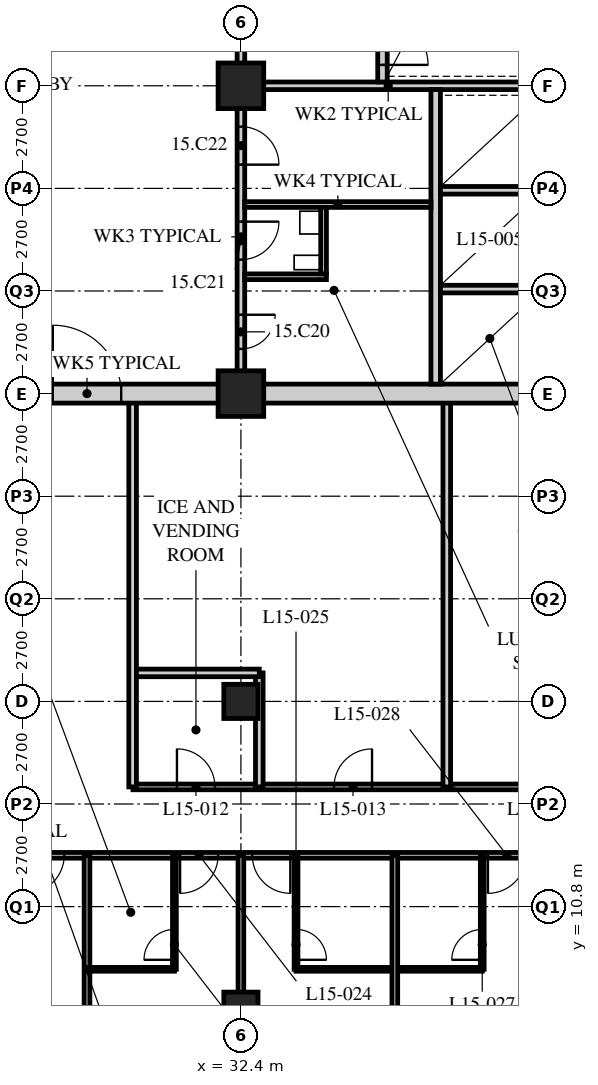
"""IFC4 building model, lengths in metres.
Left out: names, types, materials, properties, quantities, classifications, styles, units other than length and angle.
Written with IfcOpenShell. Run it as: python <this file> out.ifc"""

import sys

from ifc_helpers import new_model, si_unit, direction, frame, frame_2d, origin, origin_2d, place, context, subcontext, project, spatial, rectangle, hollow_rectangle, extrude, element, fill, save


model = new_model("IFC4")
c1 = context("Model", 3, precision=1e-05, world=origin(), true_north=direction((0.0, 1.0)))
c2 = subcontext(c1, "Body", "Model", "MODEL_VIEW")
j1 = project(units=[si_unit("LENGTHUNIT", "METRE"), si_unit("PLANEANGLEUNIT", "RADIAN")], contexts=[c1])
p1 = place(None, origin())
s1 = spatial("IfcSite", under=j1, at=p1, CompositionType="ELEMENT")
p2 = place(p1, origin())
s2 = spatial("IfcBuilding", under=s1, at=p2, CompositionType="ELEMENT")
p3 = place(p2, frame((0.0, 0.0, 63.6)))
s3 = spatial("IfcBuildingStorey", under=s2, at=p3, CompositionType="ELEMENT", Elevation=63.6)
for number, where, z_axis, x_axis in (
    (1, (32.4, 8.1, 0.0), (0.0, 0.0, 1.0), (1.0, 0.0, 0.0)),
    (2, (32.4, 16.2, 0.0), (0.0, 0.0, 1.0), (1.0, 0.0, 0.0)),
):
    element("IfcColumn", number, at=place(p3, frame(where, z_axis=z_axis, x_axis=x_axis)), inside=s3, PredefinedType="COLUMN", context=c2, shape_type="SweptSolid", body=[
        extrude(hollow_rectangle(XDim=0.9, YDim=0.9, WallThickness=0.09, at=origin_2d()), origin(), (0.0, 0.0, 1.0), 3.4),
    ])
for number, where, z_axis, x_axis in (
    (3, (32.4, 24.3, 0.0), (0.0, 0.0, 1.0), (1.0, 0.0, 0.0)),
    (4, (32.4, 32.4, 0.0), (0.0, 0.0, 1.0), (1.0, 0.0, 0.0)),
):
    element("IfcColumn", number, at=place(p3, frame(where, z_axis=z_axis, x_axis=x_axis)), inside=s3, PredefinedType="COLUMN", context=c2, shape_type="SweptSolid", body=[
        extrude(hollow_rectangle(XDim=1.2, YDim=1.2, WallThickness=0.12, at=origin_2d()), origin(), (0.0, 0.0, 1.0), 3.4),
    ])
p4 = place(p3, frame((8.1, 12.15, 0.0), z_axis=(0.0, 0.0, 1.0), x_axis=(1.0, 0.0, 0.0)))
e5 = element("IfcWall", 5, at=p4, inside=s3, PredefinedType="PARTITIONING", context=c2, shape_type="SweptSolid", body=[
    extrude(rectangle(XDim=36.45, YDim=0.15, at=frame_2d((18.225, 0.0))), origin(), (0.0, 0.0, 1.0), 3.19),
])
p5 = place(p4, frame((4.35, 0.0, 0.0)))
e6 = element("IfcOpeningElement", 6, at=p5, cuts=e5, PredefinedType="OPENING", context=c2, shape_type="SweptSolid", body=[
    extrude(rectangle(XDim=1.0, YDim=2.1, at=frame_2d((0.5, 1.05))), frame((0.0, 0.085, 0.0), z_axis=(0.0, -1.0, 0.0), x_axis=(1.0, 0.0, 0.0)), (0.0, 0.0, 1.0), 0.17),
])
p6 = place(p4, frame((10.55, 0.0, 0.0)))
e7 = element("IfcOpeningElement", 7, at=p6, cuts=e5, PredefinedType="OPENING", context=c2, shape_type="SweptSolid", body=[
    extrude(rectangle(XDim=1.0, YDim=2.1, at=frame_2d((0.5, 1.05))), frame((0.0, 0.085, 0.0), z_axis=(0.0, -1.0, 0.0), x_axis=(1.0, 0.0, 0.0)), (0.0, 0.0, 1.0), 0.17),
])
p7 = place(p4, frame((14.6, 0.0, 0.0)))
e8 = element("IfcOpeningElement", 8, at=p7, cuts=e5, PredefinedType="OPENING", context=c2, shape_type="SweptSolid", body=[
    extrude(rectangle(XDim=1.0, YDim=2.1, at=frame_2d((0.5, 1.05))), frame((0.0, 0.085, 0.0), z_axis=(0.0, -1.0, 0.0), x_axis=(1.0, 0.0, 0.0)), (0.0, 0.0, 1.0), 0.17),
])
p8 = place(p4, frame((18.65, 0.0, 0.0)))
e9 = element("IfcOpeningElement", 9, at=p8, cuts=e5, PredefinedType="OPENING", context=c2, shape_type="SweptSolid", body=[
    extrude(rectangle(XDim=1.0, YDim=2.1, at=frame_2d((0.5, 1.05))), frame((0.0, 0.085, 0.0), z_axis=(0.0, -1.0, 0.0), x_axis=(1.0, 0.0, 0.0)), (0.0, 0.0, 1.0), 0.17),
])
p9 = place(p4, frame((22.7, 0.0, 0.0)))
e10 = element("IfcOpeningElement", 10, at=p9, cuts=e5, PredefinedType="OPENING", context=c2, shape_type="SweptSolid", body=[
    extrude(rectangle(XDim=1.0, YDim=2.1, at=frame_2d((0.5, 1.05))), frame((0.0, 0.085, 0.0), z_axis=(0.0, -1.0, 0.0), x_axis=(1.0, 0.0, 0.0)), (0.0, 0.0, 1.0), 0.17),
])
p10 = place(p4, frame((24.6, 0.0, 0.0)))
e11 = element("IfcOpeningElement", 11, at=p10, cuts=e5, PredefinedType="OPENING", context=c2, shape_type="SweptSolid", body=[
    extrude(rectangle(XDim=1.0, YDim=2.1, at=frame_2d((0.5, 1.05))), frame((0.0, 0.085, 0.0), z_axis=(0.0, -1.0, 0.0), x_axis=(1.0, 0.0, 0.0)), (0.0, 0.0, 1.0), 0.17),
])
p11 = place(p4, frame((30.8, 0.0, 0.0)))
e12 = element("IfcOpeningElement", 12, at=p11, cuts=e5, PredefinedType="OPENING", context=c2, shape_type="SweptSolid", body=[
    extrude(rectangle(XDim=1.0, YDim=2.1, at=frame_2d((0.5, 1.05))), frame((0.0, 0.085, 0.0), z_axis=(0.0, -1.0, 0.0), x_axis=(1.0, 0.0, 0.0)), (0.0, 0.0, 1.0), 0.17),
])
p12 = place(p4, frame((1.525, 0.0, 0.0)))
e13 = element("IfcOpeningElement", 13, at=p12, cuts=e5, PredefinedType="OPENING", context=c2, shape_type="SweptSolid", body=[
    extrude(rectangle(XDim=1.0, YDim=2.1, at=frame_2d((0.5, 1.05))), frame((0.0, 0.085, 0.0), z_axis=(0.0, -1.0, 0.0), x_axis=(1.0, 0.0, 0.0)), (0.0, 0.0, 1.0), 0.17),
])
p13 = place(p4, frame((33.925, 0.0, 0.0)))
e14 = element("IfcOpeningElement", 14, at=p13, cuts=e5, PredefinedType="OPENING", context=c2, shape_type="SweptSolid", body=[
    extrude(rectangle(XDim=1.0, YDim=2.1, at=frame_2d((0.5, 1.05))), frame((0.0, 0.085, 0.0), z_axis=(0.0, -1.0, 0.0), x_axis=(1.0, 0.0, 0.0)), (0.0, 0.0, 1.0), 0.17),
])
p14 = place(p3, frame((29.56, 13.95, 0.0), z_axis=(0.0, 0.0, 1.0), x_axis=(1.0, 0.0, 0.0)))
e15 = element("IfcWall", 15, at=p14, inside=s3, PredefinedType="PARTITIONING", context=c2, shape_type="SweptSolid", body=[
    extrude(rectangle(XDim=13.19, YDim=0.15, at=frame_2d((6.595, 0.0))), origin(), (0.0, 0.0, 1.0), 3.19),
])
p15 = place(p14, frame((1.157, 0.0, 0.0)))
e16 = element("IfcOpeningElement", 16, at=p15, cuts=e15, PredefinedType="OPENING", context=c2, shape_type="SweptSolid", body=[
    extrude(rectangle(XDim=1.0, YDim=2.1, at=frame_2d((0.5, 1.05))), frame((0.0, 0.085, 0.0), z_axis=(0.0, -1.0, 0.0), x_axis=(1.0, 0.0, 0.0)), (0.0, 0.0, 1.0), 0.17),
])
p16 = place(p14, frame((5.29, 0.0, 0.0)))
e17 = element("IfcOpeningElement", 17, at=p16, cuts=e15, PredefinedType="OPENING", context=c2, shape_type="SweptSolid", body=[
    extrude(rectangle(XDim=1.0, YDim=2.1, at=frame_2d((0.5, 1.05))), frame((0.0, 0.085, 0.0), z_axis=(0.0, -1.0, 0.0), x_axis=(1.0, 0.0, 0.0)), (0.0, 0.0, 1.0), 0.17),
])
p17 = place(p14, frame((10.223, 0.0, 0.0)))
e18 = element("IfcOpeningElement", 18, at=p17, cuts=e15, PredefinedType="OPENING", context=c2, shape_type="SweptSolid", body=[
    extrude(rectangle(XDim=1.0, YDim=2.1, at=frame_2d((0.5, 1.05))), frame((0.0, 0.085, 0.0), z_axis=(0.0, -1.0, 0.0), x_axis=(1.0, 0.0, 0.0)), (0.0, 0.0, 1.0), 0.17),
])
p18 = place(p3, frame((32.883, 13.95, 0.0), z_axis=(0.0, 0.0, 1.0), x_axis=(0.0, 1.0, 0.0)))
e19 = element("IfcWall", 19, at=p18, inside=s3, PredefinedType="SOLIDWALL", context=c2, shape_type="SweptSolid", body=[
    extrude(rectangle(XDim=3.0, YDim=0.2, at=frame_2d((1.5, 0.0))), origin(), (0.0, 0.0, 1.0), 3.19),
])
p19 = place(p3, frame((29.55, 16.95, 0.0), z_axis=(0.0, 0.0, 1.0), x_axis=(1.0, 0.0, 0.0)))
e20 = element("IfcWall", 20, at=p19, inside=s3, PredefinedType="SOLIDWALL", context=c2, shape_type="SweptSolid", body=[
    extrude(rectangle(XDim=3.333, YDim=0.2, at=frame_2d((1.667, 0.0))), origin(), (0.0, 0.0, 1.0), 3.19),
])
for number, where, z_axis, x_axis in (
    (21, (37.817, 13.95, 0.0), (0.0, 0.0, 1.0), (0.0, 1.0, 0.0)),
    (22, (29.55, 13.95, 0.0), (0.0, 0.0, 1.0), (0.0, 1.0, 0.0)),
):
    element("IfcWall", number, at=place(p3, frame(where, z_axis=z_axis, x_axis=x_axis)), inside=s3, PredefinedType="SOLIDWALL", context=c2, shape_type="SweptSolid", body=[
        extrude(rectangle(XDim=10.35, YDim=0.2, at=frame_2d((5.175, 0.0))), origin(), (0.0, 0.0, 1.0), 3.19),
    ])
p20 = place(p3, frame((28.35, 12.15, 0.0), z_axis=(0.0, 0.0, 1.0), x_axis=(0.0, -1.0, 0.0)))
e23 = element("IfcWall", 23, at=p20, inside=s3, PredefinedType="PARTITIONING", context=c2, shape_type="SweptSolid", body=[
    extrude(rectangle(XDim=11.85, YDim=0.15, at=frame_2d((5.925, 0.0))), origin(), (0.0, 0.0, 1.0), 3.19),
])
p21 = place(p3, frame((28.35, 9.15, 0.0), z_axis=(0.0, 0.0, 1.0), x_axis=(1.0, 0.0, 0.0)))
e24 = element("IfcWall", 24, at=p21, inside=s3, PredefinedType="PARTITIONING", context=c2, shape_type="SweptSolid", body=[
    extrude(rectangle(XDim=2.3, YDim=0.1, at=frame_2d((1.15, 0.0))), origin(), (0.0, 0.0, 1.0), 3.19),
])
p22 = place(p3, frame((30.65, 12.15, 0.0), z_axis=(0.0, 0.0, 1.0), x_axis=(0.0, -1.0, 0.0)))
e25 = element("IfcWall", 25, at=p22, inside=s3, PredefinedType="PARTITIONING", context=c2, shape_type="SweptSolid", body=[
    extrude(rectangle(XDim=3.0, YDim=0.1, at=frame_2d((1.5, 0.0))), origin(), (0.0, 0.0, 1.0), 3.19),
])
p23 = place(p22, frame((1.95, 0.0, 0.0)))
e26 = element("IfcOpeningElement", 26, at=p23, cuts=e25, PredefinedType="OPENING", context=c2, shape_type="SweptSolid", body=[
    extrude(rectangle(XDim=0.8, YDim=2.1, at=frame_2d((0.4, 1.05))), frame((0.0, 0.06, 0.0), z_axis=(0.0, -1.0, 0.0), x_axis=(1.0, 0.0, 0.0)), (0.0, 0.0, 1.0), 0.12),
])
p24 = place(p3, frame((32.4, 12.15, 0.0), z_axis=(0.0, 0.0, 1.0), x_axis=(0.0, -1.0, 0.0)))
e27 = element("IfcWall", 27, at=p24, inside=s3, PredefinedType="PARTITIONING", context=c2, shape_type="SweptSolid", body=[
    extrude(rectangle(XDim=11.85, YDim=0.15, at=frame_2d((5.925, 0.0))), origin(), (0.0, 0.0, 1.0), 2.578),
])
p25 = place(p3, frame((33.85, 9.15, 0.0), z_axis=(0.0, 0.0, 1.0), x_axis=(1.0, 0.0, 0.0)))
e28 = element("IfcWall", 28, at=p25, inside=s3, PredefinedType="PARTITIONING", context=c2, shape_type="SweptSolid", body=[
    extrude(rectangle(XDim=4.9, YDim=0.1, at=frame_2d((2.45, 0.0))), origin(), (0.0, 0.0, 1.0), 3.19),
])
p26 = place(p3, frame((33.85, 12.15, 0.0), z_axis=(0.0, 0.0, 1.0), x_axis=(0.0, -1.0, 0.0)))
e29 = element("IfcWall", 29, at=p26, inside=s3, PredefinedType="PARTITIONING", context=c2, shape_type="SweptSolid", body=[
    extrude(rectangle(XDim=3.0, YDim=0.1, at=frame_2d((1.5, 0.0))), origin(), (0.0, 0.0, 1.0), 3.19),
])
p27 = place(p26, frame((1.95, 0.0, 0.0)))
e30 = element("IfcOpeningElement", 30, at=p27, cuts=e29, PredefinedType="OPENING", context=c2, shape_type="SweptSolid", body=[
    extrude(rectangle(XDim=0.8, YDim=2.1, at=frame_2d((0.4, 1.05))), frame((0.0, 0.06, 0.0), z_axis=(0.0, -1.0, 0.0), x_axis=(1.0, 0.0, 0.0)), (0.0, 0.0, 1.0), 0.12),
])
p28 = place(p3, frame((36.45, 12.15, 0.0), z_axis=(0.0, 0.0, 1.0), x_axis=(0.0, -1.0, 0.0)))
e31 = element("IfcWall", 31, at=p28, inside=s3, PredefinedType="PARTITIONING", context=c2, shape_type="SweptSolid", body=[
    extrude(rectangle(XDim=11.85, YDim=0.15, at=frame_2d((5.925, 0.0))), origin(), (0.0, 0.0, 1.0), 3.19),
])
p29 = place(p3, frame((38.75, 12.15, 0.0), z_axis=(0.0, 0.0, 1.0), x_axis=(0.0, -1.0, 0.0)))
e32 = element("IfcWall", 32, at=p29, inside=s3, PredefinedType="PARTITIONING", context=c2, shape_type="SweptSolid", body=[
    extrude(rectangle(XDim=3.0, YDim=0.1, at=frame_2d((1.5, 0.0))), origin(), (0.0, 0.0, 1.0), 3.19),
])
p30 = place(p29, frame((1.95, 0.0, 0.0)))
e33 = element("IfcOpeningElement", 33, at=p30, cuts=e32, PredefinedType="OPENING", context=c2, shape_type="SweptSolid", body=[
    extrude(rectangle(XDim=0.8, YDim=2.1, at=frame_2d((0.4, 1.05))), frame((0.0, 0.06, 0.0), z_axis=(0.0, -1.0, 0.0), x_axis=(1.0, 0.0, 0.0)), (0.0, 0.0, 1.0), 0.12),
])
p31 = place(p3, frame((15.95, 24.3, 0.0), z_axis=(0.0, 0.0, 1.0), x_axis=(1.0, 0.0, 0.0)))
e34 = element("IfcWall", 34, at=p31, inside=s3, PredefinedType="SOLIDWALL", context=c2, shape_type="SweptSolid", body=[
    extrude(rectangle(XDim=24.8, YDim=0.5, at=frame_2d((12.4, 0.0))), origin(), (0.0, 0.0, 1.0), 2.54),
])
p32 = place(p31, frame((11.5, 0.0, 0.0)))
e35 = element("IfcOpeningElement", 35, at=p32, cuts=e34, PredefinedType="OPENING", context=c2, shape_type="SweptSolid", body=[
    extrude(rectangle(XDim=1.8, YDim=2.4, at=frame_2d((0.9, 1.2))), frame((0.0, 0.26, 0.0), z_axis=(0.0, -1.0, 0.0), x_axis=(1.0, 0.0, 0.0)), (0.0, 0.0, 1.0), 0.52),
])
p33 = place(p3, frame((32.3, 32.4, 0.0), z_axis=(0.0, 0.0, 1.0), x_axis=(1.0, 0.0, 0.0)))
e36 = element("IfcWall", 36, at=p33, inside=s3, PredefinedType="SOLIDWALL", context=c2, shape_type="SweptSolid", body=[
    extrude(rectangle(XDim=7.95, YDim=0.2, at=frame_2d((3.975, 0.0))), origin(), (0.0, 0.0, 1.0), 2.578),
])
p34 = place(p3, frame((32.4, 32.5, 0.0), z_axis=(0.0, 0.0, 1.0), x_axis=(0.0, 1.0, 0.0)))
e37 = element("IfcWall", 37, at=p34, inside=s3, PredefinedType="SOLIDWALL", context=c2, shape_type="SweptSolid", body=[
    extrude(rectangle(XDim=7.75, YDim=0.2, at=frame_2d((3.875, 0.0))), origin(), (0.0, 0.0, 1.0), 2.578),
])
p35 = place(p34, frame((1.9, 0.0, 0.0)))
e38 = element("IfcOpeningElement", 38, at=p35, cuts=e37, PredefinedType="OPENING", context=c2, shape_type="SweptSolid", body=[
    extrude(rectangle(XDim=1.2, YDim=2.1, at=frame_2d((0.6, 1.05))), frame((0.0, 0.11, 0.0), z_axis=(0.0, -1.0, 0.0), x_axis=(1.0, 0.0, 0.0)), (0.0, 0.0, 1.0), 0.22),
])
p36 = place(p3, frame((37.525, 24.55, 0.0), z_axis=(0.0, 0.0, 1.0), x_axis=(0.0, 1.0, 0.0)))
e39 = element("IfcWall", 39, at=p36, inside=s3, PredefinedType="SOLIDWALL", context=c2, shape_type="SweptSolid", body=[
    extrude(rectangle(XDim=7.75, YDim=0.25, at=frame_2d((3.875, 0.0))), origin(), (0.0, 0.0, 1.0), 3.19),
])
for number, where, z_axis, x_axis in (
    (40, (37.65, 27.05, 0.0), (0.0, 0.0, 1.0), (1.0, 0.0, 0.0)),
    (41, (37.65, 29.65, 0.0), (0.0, 0.0, 1.0), (1.0, 0.0, 0.0)),
):
    element("IfcWall", number, at=place(p3, frame(where, z_axis=z_axis, x_axis=x_axis)), inside=s3, PredefinedType="SOLIDWALL", context=c2, shape_type="SweptSolid", body=[
        extrude(rectangle(XDim=2.6, YDim=0.2, at=frame_2d((1.3, 0.0))), origin(), (0.0, 0.0, 1.0), 3.19),
    ])
p37 = place(p3, frame((36.125, 32.5, 0.0), z_axis=(0.0, 0.0, 1.0), x_axis=(0.0, 1.0, 0.0)))
e42 = element("IfcWall", 42, at=p37, inside=s3, PredefinedType="SOLIDWALL", context=c2, shape_type="SweptSolid", body=[
    extrude(rectangle(XDim=7.75, YDim=0.25, at=frame_2d((3.875, 0.0))), origin(), (0.0, 0.0, 1.0), 3.19),
])
p38 = place(p37, frame((0.45, 0.0, 0.0)))
e43 = element("IfcOpeningElement", 43, at=p38, cuts=e42, PredefinedType="OPENING", context=c2, shape_type="SweptSolid", body=[
    extrude(rectangle(XDim=1.2, YDim=2.1, at=frame_2d((0.6, 1.05))), frame((0.0, 0.135, 0.0), z_axis=(0.0, -1.0, 0.0), x_axis=(1.0, 0.0, 0.0)), (0.0, 0.0, 1.0), 0.27),
])
p39 = place(p3, frame((32.4, 24.55, 0.0), z_axis=(0.0, 0.0, 1.0), x_axis=(0.0, 1.0, 0.0)))
e44 = element("IfcWall", 44, at=p39, inside=s3, PredefinedType="PARTITIONING", context=c2, shape_type="SweptSolid", body=[
    extrude(rectangle(XDim=7.75, YDim=0.2, at=frame_2d((3.875, 0.0))), origin(), (0.0, 0.0, 1.0), 2.578),
])
p40 = place(p39, frame((0.925, 0.0, 0.0)))
e45 = element("IfcOpeningElement", 45, at=p40, cuts=e44, PredefinedType="OPENING", context=c2, shape_type="SweptSolid", body=[
    extrude(rectangle(XDim=0.9, YDim=2.1, at=frame_2d((0.45, 1.05))), frame((0.0, 0.11, 0.0), z_axis=(0.0, -1.0, 0.0), x_axis=(1.0, 0.0, 0.0)), (0.0, 0.0, 1.0), 0.22),
])
p41 = place(p39, frame((3.275, 0.0, 0.0)))
e46 = element("IfcOpeningElement", 46, at=p41, cuts=e44, PredefinedType="OPENING", context=c2, shape_type="SweptSolid", body=[
    extrude(rectangle(XDim=1.0, YDim=2.1, at=frame_2d((0.5, 1.05))), frame((0.0, 0.11, 0.0), z_axis=(0.0, -1.0, 0.0), x_axis=(1.0, 0.0, 0.0)), (0.0, 0.0, 1.0), 0.22),
])
p42 = place(p39, frame((5.775, 0.0, 0.0)))
e47 = element("IfcOpeningElement", 47, at=p42, cuts=e44, PredefinedType="OPENING", context=c2, shape_type="SweptSolid", body=[
    extrude(rectangle(XDim=1.0, YDim=2.1, at=frame_2d((0.5, 1.05))), frame((0.0, 0.11, 0.0), z_axis=(0.0, -1.0, 0.0), x_axis=(1.0, 0.0, 0.0)), (0.0, 0.0, 1.0), 0.22),
])
p43 = place(p3, frame((32.5, 27.375, 0.0), z_axis=(0.0, 0.0, 1.0), x_axis=(1.0, 0.0, 0.0)))
e48 = element("IfcWall", 48, at=p43, inside=s3, PredefinedType="PARTITIONING", context=c2, shape_type="SweptSolid", body=[
    extrude(rectangle(XDim=2.15, YDim=0.15, at=frame_2d((1.075, 0.0))), origin(), (0.0, 0.0, 1.0), 3.19),
])
p44 = place(p3, frame((32.5, 29.275, 0.0), z_axis=(0.0, 0.0, 1.0), x_axis=(1.0, 0.0, 0.0)))
e49 = element("IfcWall", 49, at=p44, inside=s3, PredefinedType="PARTITIONING", context=c2, shape_type="SweptSolid", body=[
    extrude(rectangle(XDim=4.9, YDim=0.15, at=frame_2d((2.45, 0.0))), origin(), (0.0, 0.0, 1.0), 3.19),
])
p45 = place(p3, frame((34.575, 27.45, 0.0), z_axis=(0.0, 0.0, 1.0), x_axis=(0.0, 1.0, 0.0)))
e50 = element("IfcWall", 50, at=p45, inside=s3, PredefinedType="PARTITIONING", context=c2, shape_type="SweptSolid", body=[
    extrude(rectangle(XDim=1.75, YDim=0.15, at=frame_2d((0.875, 0.0))), origin(), (0.0, 0.0, 1.0), 3.19),
])
p46 = place(p15, origin())
e51 = element("IfcDoor", 51, at=p46, inside=s3, OperationType="SINGLE_SWING_LEFT", PredefinedType="DOOR", context=c2, shape_type="SweptSolid", body=[
    extrude(rectangle(XDim=1.0, YDim=2.1, at=frame_2d((0.5, 1.05))), frame((0.0, 0.025, 0.0), z_axis=(0.0, -1.0, 0.0), x_axis=(1.0, 0.0, 0.0)), (0.0, 0.0, 1.0), 0.05),
])
fill(e16, e51)
p47 = place(p16, origin())
e52 = element("IfcDoor", 52, at=p47, inside=s3, OperationType="SINGLE_SWING_RIGHT", PredefinedType="DOOR", context=c2, shape_type="SweptSolid", body=[
    extrude(rectangle(XDim=1.0, YDim=2.1, at=frame_2d((0.5, 1.05))), frame((0.0, 0.025, 0.0), z_axis=(0.0, -1.0, 0.0), x_axis=(1.0, 0.0, 0.0)), (0.0, 0.0, 1.0), 0.05),
])
fill(e17, e52)
p48 = place(p8, origin())
e53 = element("IfcDoor", 53, at=p48, inside=s3, OperationType="SINGLE_SWING_RIGHT", PredefinedType="DOOR", context=c2, shape_type="SweptSolid", body=[
    extrude(rectangle(XDim=1.0, YDim=2.1, at=frame_2d((0.5, 1.05))), frame((0.0, 0.025, 0.0), z_axis=(0.0, -1.0, 0.0), x_axis=(1.0, 0.0, 0.0)), (0.0, 0.0, 1.0), 0.05),
])
fill(e9, e53)
p49 = place(p23, origin())
e54 = element("IfcDoor", 54, at=p49, inside=s3, OperationType="SINGLE_SWING_LEFT", PredefinedType="DOOR", context=c2, shape_type="SweptSolid", body=[
    extrude(rectangle(XDim=0.8, YDim=2.1, at=frame_2d((0.4, 1.05))), frame((0.0, 0.025, 0.0), z_axis=(0.0, -1.0, 0.0), x_axis=(1.0, 0.0, 0.0)), (0.0, 0.0, 1.0), 0.05),
])
fill(e26, e54)
p50 = place(p9, origin())
e55 = element("IfcDoor", 55, at=p50, inside=s3, OperationType="SINGLE_SWING_RIGHT", PredefinedType="DOOR", context=c2, shape_type="SweptSolid", body=[
    extrude(rectangle(XDim=1.0, YDim=2.1, at=frame_2d((0.5, 1.05))), frame((0.0, 0.025, 0.0), z_axis=(0.0, -1.0, 0.0), x_axis=(1.0, 0.0, 0.0)), (0.0, 0.0, 1.0), 0.05),
])
fill(e10, e55)
p51 = place(p27, origin())
e56 = element("IfcDoor", 56, at=p51, inside=s3, OperationType="SINGLE_SWING_RIGHT", PredefinedType="DOOR", context=c2, shape_type="SweptSolid", body=[
    extrude(rectangle(XDim=0.8, YDim=2.1, at=frame_2d((0.4, 1.05))), frame((0.0, 0.025, 0.0), z_axis=(0.0, -1.0, 0.0), x_axis=(1.0, 0.0, 0.0)), (0.0, 0.0, 1.0), 0.05),
])
fill(e30, e56)
p52 = place(p10, origin())
e57 = element("IfcDoor", 57, at=p52, inside=s3, OperationType="SINGLE_SWING_LEFT", PredefinedType="DOOR", context=c2, shape_type="SweptSolid", body=[
    extrude(rectangle(XDim=1.0, YDim=2.1, at=frame_2d((0.5, 1.05))), frame((0.0, 0.025, 0.0), z_axis=(0.0, -1.0, 0.0), x_axis=(1.0, 0.0, 0.0)), (0.0, 0.0, 1.0), 0.05),
])
fill(e11, e57)
p53 = place(p30, origin())
e58 = element("IfcDoor", 58, at=p53, inside=s3, OperationType="SINGLE_SWING_LEFT", PredefinedType="DOOR", context=c2, shape_type="SweptSolid", body=[
    extrude(rectangle(XDim=0.8, YDim=2.1, at=frame_2d((0.4, 1.05))), frame((0.0, 0.025, 0.0), z_axis=(0.0, -1.0, 0.0), x_axis=(1.0, 0.0, 0.0)), (0.0, 0.0, 1.0), 0.05),
])
fill(e33, e58)
p54 = place(p11, origin())
e59 = element("IfcDoor", 59, at=p54, inside=s3, OperationType="SINGLE_SWING_RIGHT", PredefinedType="DOOR", context=c2, shape_type="SweptSolid", body=[
    extrude(rectangle(XDim=1.0, YDim=2.1, at=frame_2d((0.5, 1.05))), frame((0.0, 0.025, 0.0), z_axis=(0.0, -1.0, 0.0), x_axis=(1.0, 0.0, 0.0)), (0.0, 0.0, 1.0), 0.05),
])
fill(e12, e59)
p55 = place(p40, origin())
e60 = element("IfcDoor", 60, at=p55, inside=s3, OperationType="SINGLE_SWING_LEFT", PredefinedType="DOOR", context=c2, shape_type="SweptSolid", body=[
    extrude(rectangle(XDim=0.9, YDim=2.1, at=frame_2d((0.45, 1.05))), frame((0.0, 0.025, 0.0), z_axis=(0.0, -1.0, 0.0), x_axis=(1.0, 0.0, 0.0)), (0.0, 0.0, 1.0), 0.05),
])
fill(e45, e60)
p56 = place(p41, origin())
e61 = element("IfcDoor", 61, at=p56, inside=s3, OperationType="SINGLE_SWING_LEFT", PredefinedType="DOOR", context=c2, shape_type="SweptSolid", body=[
    extrude(rectangle(XDim=1.0, YDim=2.1, at=frame_2d((0.5, 1.05))), frame((0.0, 0.025, 0.0), z_axis=(0.0, -1.0, 0.0), x_axis=(1.0, 0.0, 0.0)), (0.0, 0.0, 1.0), 0.05),
])
fill(e46, e61)
p57 = place(p42, origin())
e62 = element("IfcDoor", 62, at=p57, inside=s3, OperationType="SINGLE_SWING_RIGHT", PredefinedType="DOOR", context=c2, shape_type="SweptSolid", body=[
    extrude(rectangle(XDim=1.0, YDim=2.1, at=frame_2d((0.5, 1.05))), frame((0.0, 0.025, 0.0), z_axis=(0.0, -1.0, 0.0), x_axis=(1.0, 0.0, 0.0)), (0.0, 0.0, 1.0), 0.05),
])
fill(e47, e62)
p58 = place(p38, origin())
e63 = element("IfcDoor", 63, at=p58, inside=s3, OperationType="SINGLE_SWING_RIGHT", PredefinedType="DOOR", context=c2, shape_type="SweptSolid", body=[
    extrude(rectangle(XDim=1.2, YDim=2.1, at=frame_2d((0.6, 1.05))), frame((0.0, 0.025, 0.0), z_axis=(0.0, -1.0, 0.0), x_axis=(1.0, 0.0, 0.0)), (0.0, 0.0, 1.0), 0.05),
])
fill(e43, e63)
p59 = place(p32, origin())
e64 = element("IfcDoor", 64, at=p59, inside=s3, OperationType="DOUBLE_DOOR_SINGLE_SWING", PredefinedType="DOOR", context=c2, shape_type="SweptSolid", body=[
    extrude(rectangle(XDim=1.8, YDim=2.4, at=frame_2d((0.9, 1.2))), frame((0.0, 0.025, 0.0), z_axis=(0.0, -1.0, 0.0), x_axis=(1.0, 0.0, 0.0)), (0.0, 0.0, 1.0), 0.05),
])
fill(e35, e64)
save(model, sys.argv[1])
